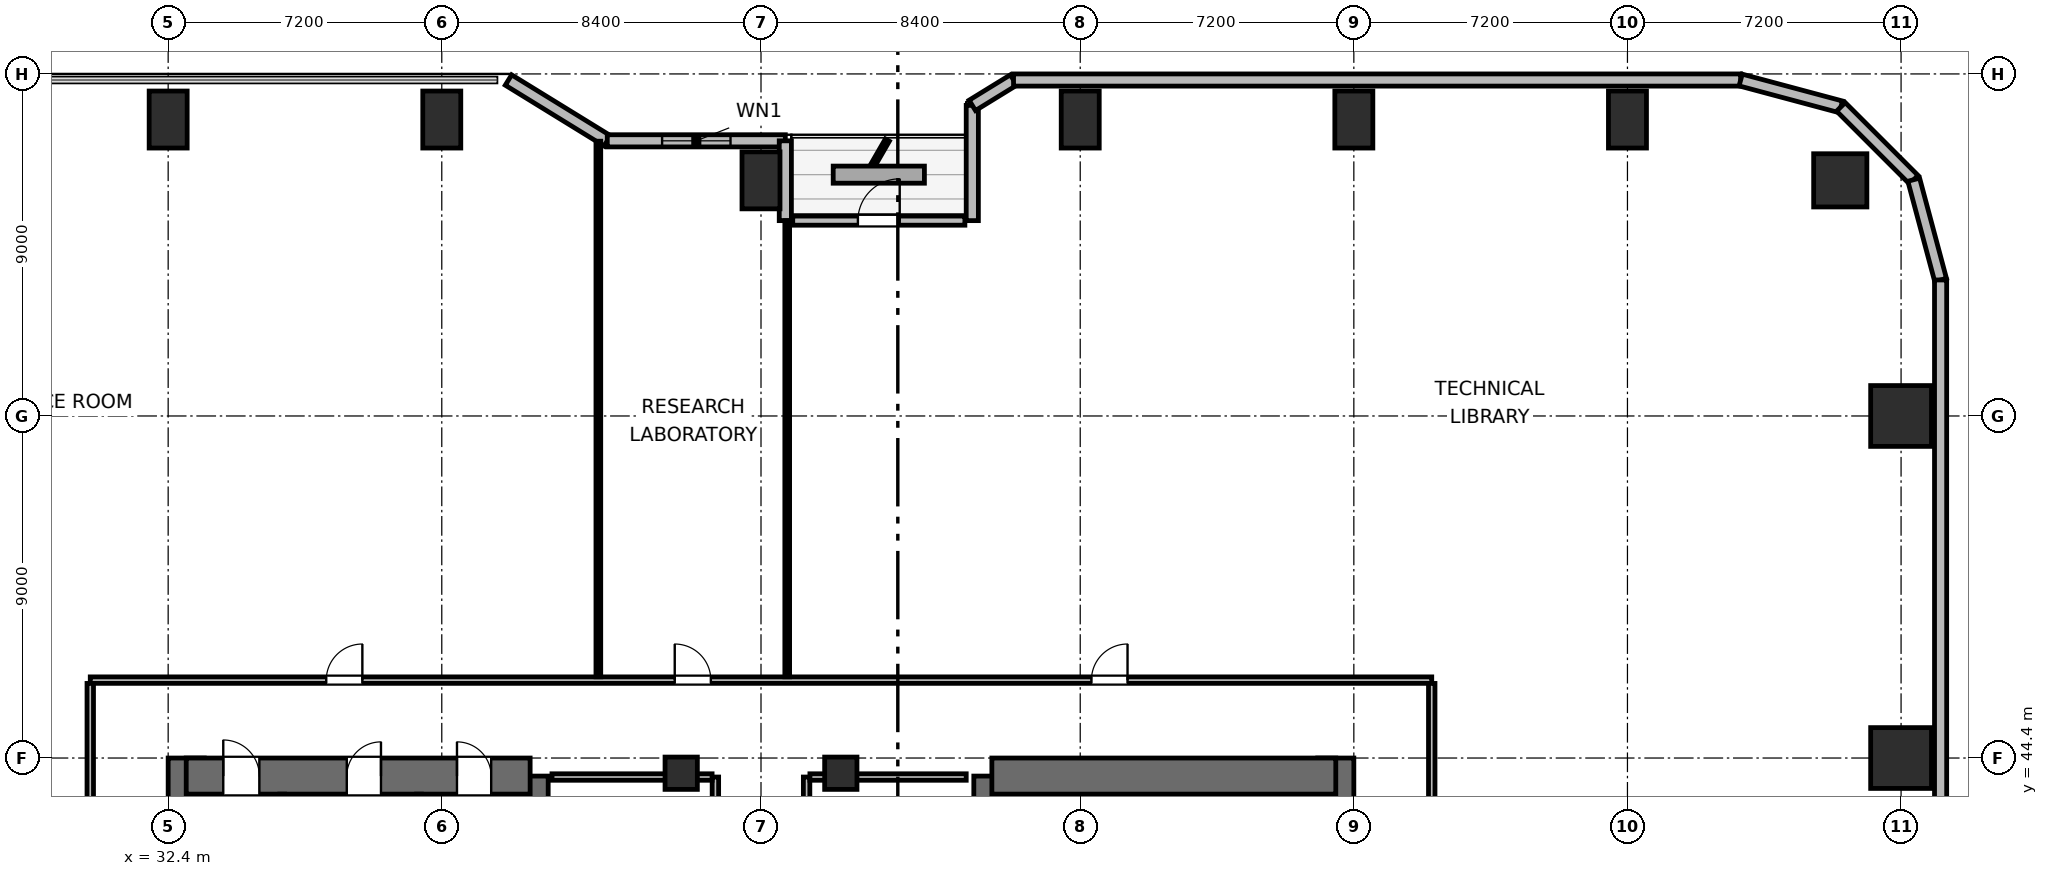
"""IFC4 building model, lengths in metres.
Left out: names, types, materials, properties, quantities, classifications, styles, units other than length and angle.
Written with IfcOpenShell. Run it as: python <this file> out.ifc"""

import sys

from ifc_helpers import new_model, si_unit, direction, frame, frame_2d, origin, origin_2d, place, context, subcontext, project, spatial, rectangle, circle, extrude, element, fill, save


model = new_model("IFC4")
c1 = context("Model", 3, precision=1e-05, world=origin(), true_north=direction((0.0, 1.0)))
c2 = subcontext(c1, "Body", "Model", "MODEL_VIEW")
j1 = project(units=[si_unit("LENGTHUNIT", "METRE"), si_unit("PLANEANGLEUNIT", "RADIAN")], contexts=[c1])
p1 = place(None, origin())
s1 = spatial("IfcSite", under=j1, at=p1, CompositionType="ELEMENT")
p2 = place(p1, origin())
s2 = spatial("IfcBuilding", under=s1, at=p2, CompositionType="ELEMENT")
p3 = place(p2, frame((0.0, 0.0, 21.6)))
s3 = spatial("IfcBuildingStorey", under=s2, at=p3, CompositionType="ELEMENT", Elevation=21.6)
p4 = place(p3, frame((32.875, 27.6, 0.0), z_axis=(0.0, 0.0, 1.0), x_axis=(0.0, 1.0, 0.0)))
e1 = element("IfcWall", 1, at=p4, inside=s3, PredefinedType="SHEAR", context=c2, shape_type="SweptSolid", body=[
    extrude(rectangle(XDim=16.8, YDim=0.95, at=frame_2d((8.4, 0.0))), origin(), (0.0, 0.0, 1.0), 3.9),
])
p5 = place(p3, frame((41.925, 37.8, 0.0), z_axis=(0.0, 0.0, 1.0), x_axis=(0.0, 1.0, 0.0)))
e2 = element("IfcWall", 2, at=p5, inside=s3, PredefinedType="SHEAR", context=c2, shape_type="SweptSolid", body=[
    extrude(rectangle(XDim=6.125, YDim=0.95, at=frame_2d((3.062, 0.0))), origin(), (0.0, 0.0, 1.0), 3.9),
])
p6 = place(p3, frame((32.875, 43.925, 0.0), z_axis=(0.0, 0.0, 1.0), x_axis=(1.0, 0.0, 0.0)))
e3 = element("IfcWall", 3, at=p6, inside=s3, PredefinedType="SHEAR", context=c2, shape_type="SweptSolid", body=[
    extrude(rectangle(XDim=9.05, YDim=0.95, at=frame_2d((4.525, 0.0))), origin(), (0.0, 0.0, 1.0), 3.9),
])
p7 = place(p6, frame((0.975, 0.0, 0.0)))
e4 = element("IfcOpeningElement", 4, at=p7, cuts=e3, PredefinedType="OPENING", context=c2, shape_type="SweptSolid", body=[
    extrude(rectangle(XDim=0.95, YDim=2.04, at=frame_2d((0.475, 1.02))), frame((0.0, 0.485, 0.0), z_axis=(0.0, -1.0, 0.0), x_axis=(1.0, 0.0, 0.0)), (0.0, 0.0, 1.0), 0.97),
])
p8 = place(p6, frame((4.225, 0.0, 0.0)))
e5 = element("IfcOpeningElement", 5, at=p8, cuts=e3, PredefinedType="OPENING", context=c2, shape_type="SweptSolid", body=[
    extrude(rectangle(XDim=0.9, YDim=2.02, at=frame_2d((0.45, 1.01))), frame((0.0, 0.485, 0.0), z_axis=(0.0, -1.0, 0.0), x_axis=(1.0, 0.0, 0.0)), (0.0, 0.0, 1.0), 0.97),
])
p9 = place(p6, frame((7.125, 0.0, 0.0)))
e6 = element("IfcOpeningElement", 6, at=p9, cuts=e3, PredefinedType="OPENING", context=c2, shape_type="SweptSolid", body=[
    extrude(rectangle(XDim=0.9, YDim=2.02, at=frame_2d((0.45, 1.01))), frame((0.0, 0.485, 0.0), z_axis=(0.0, -1.0, 0.0), x_axis=(1.0, 0.0, 0.0)), (0.0, 0.0, 1.0), 0.97),
])
p10 = place(p3, frame((54.075, 38.0, 0.0), z_axis=(0.0, 0.0, 1.0), x_axis=(0.0, 1.0, 0.0)))
e7 = element("IfcWall", 7, at=p10, inside=s3, PredefinedType="SHEAR", context=c2, shape_type="SweptSolid", body=[
    extrude(rectangle(XDim=5.925, YDim=0.95, at=frame_2d((2.962, 0.0))), origin(), (0.0, 0.0, 1.0), 3.9),
])
p11 = place(p3, frame((63.125, 27.6, 0.0), z_axis=(0.0, 0.0, 1.0), x_axis=(0.0, 1.0, 0.0)))
e8 = element("IfcWall", 8, at=p11, inside=s3, PredefinedType="SHEAR", context=c2, shape_type="SweptSolid", body=[
    extrude(rectangle(XDim=16.8, YDim=0.95, at=frame_2d((8.4, 0.0))), origin(), (0.0, 0.0, 1.0), 3.9),
])
p12 = place(p3, frame((54.075, 43.925, 0.0), z_axis=(0.0, 0.0, 1.0), x_axis=(1.0, 0.0, 0.0)))
e9 = element("IfcWall", 9, at=p12, inside=s3, PredefinedType="SHEAR", context=c2, shape_type="SweptSolid", body=[
    extrude(rectangle(XDim=9.05, YDim=0.95, at=frame_2d((4.525, 0.0))), origin(), (0.0, 0.0, 1.0), 3.9),
])
p13 = place(p3, frame((76.4, 59.6, 0.0), z_axis=(0.0, 0.0, 1.0), x_axis=(1.0, 0.0, 0.0)))
e10 = element("IfcColumn", 10, at=p13, inside=s3, PredefinedType="COLUMN", context=c2, shape_type="SweptSolid", body=[
    extrude(circle(Radius=0.7, at=origin_2d()), origin(), (0.0, 0.0, 1.0), 3.9),
])
for number, where, z_axis, x_axis in (
    (11, (32.4, 61.2, 0.0), (0.0, 0.0, 1.0), (1.0, 0.0, 0.0)),
    (12, (39.6, 61.2, 0.0), (0.0, 0.0, 1.0), (1.0, 0.0, 0.0)),
    (13, (48.0, 59.6, 0.0), (0.0, 0.0, 1.0), (1.0, 0.0, 0.0)),
    (14, (56.4, 61.2, 0.0), (0.0, 0.0, 1.0), (1.0, 0.0, 0.0)),
    (15, (63.6, 61.2, 0.0), (0.0, 0.0, 1.0), (1.0, 0.0, 0.0)),
    (16, (70.8, 61.2, 0.0), (0.0, 0.0, 1.0), (1.0, 0.0, 0.0)),
):
    element("IfcColumn", number, at=place(p3, frame(where, z_axis=z_axis, x_axis=x_axis)), inside=s3, PredefinedType="COLUMN", context=c2, shape_type="SweptSolid", body=[
        extrude(rectangle(XDim=1.0, YDim=1.5, at=origin_2d()), origin(), (0.0, 0.0, 1.0), 3.9),
    ])
for number, where, z_axis, x_axis in (
    (17, (78.0, 44.4, 0.0), (0.0, 0.0, 1.0), (1.0, 0.0, 0.0)),
    (18, (78.0, 53.4, 0.0), (0.0, 0.0, 1.0), (1.0, 0.0, 0.0)),
):
    element("IfcColumn", number, at=place(p3, frame(where, z_axis=z_axis, x_axis=x_axis)), inside=s3, PredefinedType="COLUMN", context=c2, shape_type="SweptSolid", body=[
        extrude(rectangle(XDim=1.6, YDim=1.6, at=origin_2d()), origin(), (0.0, 0.0, 1.0), 3.9),
    ])
for number, where, z_axis, x_axis in (
    (19, (45.9, 44.0, 0.0), (0.0, 0.0, 1.0), (1.0, 0.0, 0.0)),
    (20, (50.1, 44.0, 0.0), (0.0, 0.0, 1.0), (1.0, 0.0, 0.0)),
):
    element("IfcColumn", number, at=place(p3, frame(where, z_axis=z_axis, x_axis=x_axis)), inside=s3, PredefinedType="COLUMN", context=c2, shape_type="SweptSolid", body=[
        extrude(rectangle(XDim=0.85, YDim=0.85, at=origin_2d()), origin(), (0.0, 0.0, 1.0), 3.9),
    ])
p14 = place(p3, frame((41.355, 62.24, 0.0), z_axis=(0.0, 0.0, 1.0), x_axis=(0.851630857047, -0.524142044989, 0.0)))
e21 = element("IfcWall", 21, at=p14, inside=s3, PredefinedType="SOLIDWALL", context=c2, shape_type="SweptSolid", body=[
    extrude(rectangle(XDim=3.053, YDim=0.32, at=frame_2d((1.526, 0.0))), origin(), (0.0, 0.0, 1.0), 2.875),
])
p15 = place(p3, frame((43.955, 60.64, 0.0), z_axis=(0.0, 0.0, 1.0), x_axis=(1.0, 0.0, 0.0)))
e22 = element("IfcWall", 22, at=p15, inside=s3, PredefinedType="SOLIDWALL", context=c2, shape_type="SweptSolid", body=[
    extrude(rectangle(XDim=4.685, YDim=0.32, at=frame_2d((2.343, 0.0))), origin(), (0.0, 0.0, 1.0), 2.875),
])
p16 = place(p15, frame((1.443, 0.0, 0.85)))
e23 = element("IfcOpeningElement", 23, at=p16, cuts=e22, PredefinedType="OPENING", context=c2, shape_type="SweptSolid", body=[
    extrude(rectangle(XDim=1.8, YDim=1.1, at=frame_2d((0.9, 0.55))), frame((0.0, 0.17, 0.0), z_axis=(0.0, -1.0, 0.0), x_axis=(1.0, 0.0, 0.0)), (0.0, 0.0, 1.0), 0.34),
])
p17 = place(p3, frame((48.64, 60.64, 0.0), z_axis=(0.0, 0.0, 1.0), x_axis=(0.0, -1.0, 0.0)))
e24 = element("IfcWall", 24, at=p17, inside=s3, PredefinedType="SOLIDWALL", context=c2, shape_type="SweptSolid", body=[
    extrude(rectangle(XDim=2.1, YDim=0.32, at=frame_2d((1.05, 0.0))), origin(), (0.0, 0.0, 1.0), 2.875),
])
p18 = place(p3, frame((48.835, 58.54, 0.0), z_axis=(0.0, 0.0, 1.0), x_axis=(1.0, 0.0, 0.0)))
e25 = element("IfcWall", 25, at=p18, inside=s3, PredefinedType="SOLIDWALL", context=c2, shape_type="SweptSolid", body=[
    extrude(rectangle(XDim=4.53, YDim=0.24, at=frame_2d((2.265, 0.0))), origin(), (0.0, 0.0, 1.0), 3.64),
])
p19 = place(p18, frame((1.715, 0.0, 0.0)))
e26 = element("IfcOpeningElement", 26, at=p19, cuts=e25, PredefinedType="OPENING", context=c2, shape_type="SweptSolid", body=[
    extrude(rectangle(XDim=1.1, YDim=2.04, at=frame_2d((0.55, 1.02))), frame((0.0, 0.13, 0.0), z_axis=(0.0, -1.0, 0.0), x_axis=(1.0, 0.0, 0.0)), (0.0, 0.0, 1.0), 0.26),
])
p20 = place(p3, frame((53.56, 58.54, 0.0), z_axis=(0.0, 0.0, 1.0), x_axis=(0.0, 1.0, 0.0)))
e27 = element("IfcWall", 27, at=p20, inside=s3, PredefinedType="SOLIDWALL", context=c2, shape_type="SweptSolid", body=[
    extrude(rectangle(XDim=3.032, YDim=0.32, at=frame_2d((1.516, 0.0))), origin(), (0.0, 0.0, 1.0), 2.875),
])
p21 = place(p3, frame((53.56, 61.573, 0.0), z_axis=(0.0, 0.0, 1.0), x_axis=(0.851776724646, 0.523904964045, 0.0)))
e28 = element("IfcWall", 28, at=p21, inside=s3, PredefinedType="SOLIDWALL", context=c2, shape_type="SweptSolid", body=[
    extrude(rectangle(XDim=1.274, YDim=0.32, at=frame_2d((0.637, 0.0))), origin(), (0.0, 0.0, 1.0), 3.64),
])
p22 = place(p3, frame((54.645, 62.24, 0.0), z_axis=(0.0, 0.0, 1.0), x_axis=(1.0, 0.0, 0.0)))
e29 = element("IfcWall", 29, at=p22, inside=s3, PredefinedType="SOLIDWALL", context=c2, shape_type="SweptSolid", body=[
    extrude(rectangle(XDim=19.134, YDim=0.32, at=frame_2d((9.567, 0.0))), origin(), (0.0, 0.0, 1.0), 3.64),
])
p23 = place(p3, frame((73.779, 62.24, 0.0), z_axis=(0.0, 0.0, 1.0), x_axis=(0.965964405026, -0.25867502435, 0.0)))
e30 = element("IfcWall", 30, at=p23, inside=s3, PredefinedType="SOLIDWALL", context=c2, shape_type="SweptSolid", body=[
    extrude(rectangle(XDim=2.731, YDim=0.32, at=frame_2d((1.366, 0.0))), origin(), (0.0, 0.0, 1.0), 3.64),
])
p24 = place(p3, frame((76.417, 61.533, 0.0), z_axis=(0.0, 0.0, 1.0), x_axis=(0.707106781187, -0.707106781187, 0.0)))
e31 = element("IfcWall", 31, at=p24, inside=s3, PredefinedType="SOLIDWALL", context=c2, shape_type="SweptSolid", body=[
    extrude(rectangle(XDim=2.71, YDim=0.32, at=frame_2d((1.355, 0.0))), origin(), (0.0, 0.0, 1.0), 3.64),
])
p25 = place(p3, frame((78.333, 59.617, 0.0), z_axis=(0.0, 0.0, 1.0), x_axis=(0.25869736047, -0.965958423373, 0.0)))
e32 = element("IfcWall", 32, at=p25, inside=s3, PredefinedType="SOLIDWALL", context=c2, shape_type="SweptSolid", body=[
    extrude(rectangle(XDim=2.731, YDim=0.32, at=frame_2d((1.366, 0.0))), origin(), (0.0, 0.0, 1.0), 3.64),
])
p26 = place(p3, frame((79.04, 56.979, 0.0), z_axis=(0.0, 0.0, 1.0), x_axis=(0.0, -1.0, 0.0)))
e33 = element("IfcWall", 33, at=p26, inside=s3, PredefinedType="SOLIDWALL", context=c2, shape_type="SweptSolid", body=[
    extrude(rectangle(XDim=14.219, YDim=0.32, at=frame_2d((7.109, 0.0))), origin(), (0.0, 0.0, 1.0), 3.64),
])
for number, where, z_axis, x_axis in (
    (34, (35.4, 41.095, 0.0), (0.0, 0.0, 1.0), (0.0, 1.0, 0.0)),
    (35, (39.0, 41.095, 0.0), (0.0, 0.0, 1.0), (0.0, 1.0, 0.0)),
):
    element("IfcWall", number, at=place(p3, frame(where, z_axis=z_axis, x_axis=x_axis)), inside=s3, PredefinedType="PARTITIONING", context=c2, shape_type="SweptSolid", body=[
        extrude(rectangle(XDim=2.355, YDim=0.125, at=frame_2d((1.177, 0.0))), origin(), (0.0, 0.0, 1.0), 3.64),
    ])
p27 = place(p3, frame((46.8, 37.9, 0.0), z_axis=(0.0, 0.0, 1.0), x_axis=(0.0, 1.0, 0.0)))
e36 = element("IfcWall", 36, at=p27, inside=s3, PredefinedType="PARTITIONING", context=c2, shape_type="SweptSolid", body=[
    extrude(rectangle(XDim=6.0, YDim=0.17, at=frame_2d((3.0, 0.0))), origin(), (0.0, 0.0, 1.0), 3.64),
])
p28 = place(p27, frame((1.47, 0.0, 0.0)))
e37 = element("IfcOpeningElement", 37, at=p28, cuts=e36, PredefinedType="OPENING", context=c2, shape_type="SweptSolid", body=[
    extrude(rectangle(XDim=0.9, YDim=2.02, at=frame_2d((0.45, 1.01))), frame((0.0, 0.095, 0.0), z_axis=(0.0, -1.0, 0.0), x_axis=(1.0, 0.0, 0.0)), (0.0, 0.0, 1.0), 0.19),
])
p29 = place(p27, frame((4.47, 0.0, 0.0)))
e38 = element("IfcOpeningElement", 38, at=p29, cuts=e36, PredefinedType="OPENING", context=c2, shape_type="SweptSolid", body=[
    extrude(rectangle(XDim=0.9, YDim=2.02, at=frame_2d((0.45, 1.01))), frame((0.0, 0.095, 0.0), z_axis=(0.0, -1.0, 0.0), x_axis=(1.0, 0.0, 0.0)), (0.0, 0.0, 1.0), 0.19),
])
p30 = place(p3, frame((42.5, 43.9, 0.0), z_axis=(0.0, 0.0, 1.0), x_axis=(1.0, 0.0, 0.0)))
e39 = element("IfcWall", 39, at=p30, inside=s3, PredefinedType="PARTITIONING", context=c2, shape_type="SweptSolid", body=[
    extrude(rectangle(XDim=4.213, YDim=0.17, at=frame_2d((2.106, 0.0))), origin(), (0.0, 0.0, 1.0), 2.525),
])
p31 = place(p3, frame((49.2, 37.9, 0.0), z_axis=(0.0, 0.0, 1.0), x_axis=(0.0, 1.0, 0.0)))
e40 = element("IfcWall", 40, at=p31, inside=s3, PredefinedType="PARTITIONING", context=c2, shape_type="SweptSolid", body=[
    extrude(rectangle(XDim=6.0, YDim=0.17, at=frame_2d((3.0, 0.0))), origin(), (0.0, 0.0, 1.0), 3.64),
])
p32 = place(p31, frame((2.55, 0.0, 0.0)))
e41 = element("IfcOpeningElement", 41, at=p32, cuts=e40, PredefinedType="OPENING", context=c2, shape_type="SweptSolid", body=[
    extrude(rectangle(XDim=0.9, YDim=2.02, at=frame_2d((0.45, 1.01))), frame((0.0, 0.095, 0.0), z_axis=(0.0, -1.0, 0.0), x_axis=(1.0, 0.0, 0.0)), (0.0, 0.0, 1.0), 0.19),
])
p33 = place(p3, frame((49.287, 43.9, 0.0), z_axis=(0.0, 0.0, 1.0), x_axis=(1.0, 0.0, 0.0)))
e42 = element("IfcWall", 42, at=p33, inside=s3, PredefinedType="PARTITIONING", context=c2, shape_type="SweptSolid", body=[
    extrude(rectangle(XDim=4.113, YDim=0.17, at=frame_2d((2.056, 0.0))), origin(), (0.0, 0.0, 1.0), 2.525),
])
p34 = place(p3, frame((30.35, 46.45, 0.0), z_axis=(0.0, 0.0, 1.0), x_axis=(1.0, 0.0, 0.0)))
e43 = element("IfcWall", 43, at=p34, inside=s3, PredefinedType="PARTITIONING", context=c2, shape_type="SweptSolid", body=[
    extrude(rectangle(XDim=35.3, YDim=0.17, at=frame_2d((17.65, 0.0))), origin(), (0.0, 0.0, 1.0), 3.64),
])
p35 = place(p34, frame((6.21, 0.0, 0.0)))
e44 = element("IfcOpeningElement", 44, at=p35, cuts=e43, PredefinedType="OPENING", context=c2, shape_type="SweptSolid", body=[
    extrude(rectangle(XDim=0.95, YDim=2.04, at=frame_2d((0.475, 1.02))), frame((0.0, 0.095, 0.0), z_axis=(0.0, -1.0, 0.0), x_axis=(1.0, 0.0, 0.0)), (0.0, 0.0, 1.0), 0.19),
])
p36 = place(p34, frame((15.38, 0.0, 0.0)))
e45 = element("IfcOpeningElement", 45, at=p36, cuts=e43, PredefinedType="OPENING", context=c2, shape_type="SweptSolid", body=[
    extrude(rectangle(XDim=0.95, YDim=2.04, at=frame_2d((0.475, 1.02))), frame((0.0, 0.095, 0.0), z_axis=(0.0, -1.0, 0.0), x_axis=(1.0, 0.0, 0.0)), (0.0, 0.0, 1.0), 0.19),
])
p37 = place(p34, frame((26.345, 0.0, 0.0)))
e46 = element("IfcOpeningElement", 46, at=p37, cuts=e43, PredefinedType="OPENING", context=c2, shape_type="SweptSolid", body=[
    extrude(rectangle(XDim=0.95, YDim=2.04, at=frame_2d((0.475, 1.02))), frame((0.0, 0.095, 0.0), z_axis=(0.0, -1.0, 0.0), x_axis=(1.0, 0.0, 0.0)), (0.0, 0.0, 1.0), 0.19),
])
p38 = place(p3, frame((30.35, 25.637, 0.0), z_axis=(0.0, 0.0, 1.0), x_axis=(0.0, 1.0, 0.0)))
e47 = element("IfcWall", 47, at=p38, inside=s3, PredefinedType="PARTITIONING", context=c2, shape_type="SweptSolid", body=[
    extrude(rectangle(XDim=20.726, YDim=0.17, at=frame_2d((10.363, 0.0))), origin(), (0.0, 0.0, 1.0), 3.64),
])
p39 = place(p38, frame((4.263, 0.0, 0.0)))
e48 = element("IfcOpeningElement", 48, at=p39, cuts=e47, PredefinedType="OPENING", context=c2, shape_type="SweptSolid", body=[
    extrude(rectangle(XDim=0.95, YDim=2.04, at=frame_2d((0.475, 1.02))), frame((0.0, 0.095, 0.0), z_axis=(0.0, -1.0, 0.0), x_axis=(1.0, 0.0, 0.0)), (0.0, 0.0, 1.0), 0.19),
])
p40 = place(p38, frame((14.713, 0.0, 0.0)))
e49 = element("IfcOpeningElement", 49, at=p40, cuts=e47, PredefinedType="OPENING", context=c2, shape_type="SweptSolid", body=[
    extrude(rectangle(XDim=0.95, YDim=2.04, at=frame_2d((0.475, 1.02))), frame((0.0, 0.095, 0.0), z_axis=(0.0, -1.0, 0.0), x_axis=(1.0, 0.0, 0.0)), (0.0, 0.0, 1.0), 0.19),
])
p41 = place(p3, frame((65.65, 25.637, 0.0), z_axis=(0.0, 0.0, 1.0), x_axis=(0.0, 1.0, 0.0)))
e50 = element("IfcWall", 50, at=p41, inside=s3, PredefinedType="PARTITIONING", context=c2, shape_type="SweptSolid", body=[
    extrude(rectangle(XDim=20.726, YDim=0.17, at=frame_2d((10.363, 0.0))), origin(), (0.0, 0.0, 1.0), 3.64),
])
p42 = place(p41, frame((4.163, 0.0, 0.0)))
e51 = element("IfcOpeningElement", 51, at=p42, cuts=e50, PredefinedType="OPENING", context=c2, shape_type="SweptSolid", body=[
    extrude(rectangle(XDim=0.95, YDim=2.04, at=frame_2d((0.475, 1.02))), frame((0.0, 0.095, 0.0), z_axis=(0.0, -1.0, 0.0), x_axis=(1.0, 0.0, 0.0)), (0.0, 0.0, 1.0), 0.19),
])
p43 = place(p41, frame((14.613, 0.0, 0.0)))
e52 = element("IfcOpeningElement", 52, at=p43, cuts=e50, PredefinedType="OPENING", context=c2, shape_type="SweptSolid", body=[
    extrude(rectangle(XDim=0.95, YDim=2.04, at=frame_2d((0.475, 1.02))), frame((0.0, 0.095, 0.0), z_axis=(0.0, -1.0, 0.0), x_axis=(1.0, 0.0, 0.0)), (0.0, 0.0, 1.0), 0.19),
])
p44 = place(p3, frame((43.72, 46.537, 0.0), z_axis=(0.0, 0.0, 1.0), x_axis=(0.0, 1.0, 0.0)))
e53 = element("IfcWall", 53, at=p44, inside=s3, PredefinedType="PARTITIONING", context=c2, shape_type="SweptSolid", body=[
    extrude(rectangle(XDim=14.093, YDim=0.125, at=frame_2d((7.046, 0.0))), origin(), (0.0, 0.0, 1.0), 3.003),
])
p45 = place(p3, frame((48.69, 46.537, 0.0), z_axis=(0.0, 0.0, 1.0), x_axis=(0.0, 1.0, 0.0)))
e54 = element("IfcWall", 54, at=p45, inside=s3, PredefinedType="PARTITIONING", context=c2, shape_type="SweptSolid", body=[
    extrude(rectangle(XDim=12.003, YDim=0.125, at=frame_2d((6.001, 0.0))), origin(), (0.0, 0.0, 1.0), 3.64),
])
p46 = place(p16, origin())
e55 = element("IfcWindow", 55, at=p46, inside=s3, PartitioningType="SINGLE_PANEL", PredefinedType="WINDOW", context=c2, shape_type="SweptSolid", body=[
    extrude(rectangle(XDim=1.8, YDim=1.1, at=frame_2d((0.9, 0.55))), frame((0.0, 0.03, 0.0), z_axis=(0.0, -1.0, 0.0), x_axis=(1.0, 0.0, 0.0)), (0.0, 0.0, 1.0), 0.06),
])
fill(e23, e55)
p47 = place(p19, origin())
e56 = element("IfcDoor", 56, at=p47, inside=s3, OperationType="SINGLE_SWING_RIGHT", PredefinedType="DOOR", context=c2, shape_type="SweptSolid", body=[
    extrude(rectangle(XDim=1.1, YDim=2.04, at=frame_2d((0.55, 1.02))), frame((0.0, 0.025, 0.0), z_axis=(0.0, -1.0, 0.0), x_axis=(1.0, 0.0, 0.0)), (0.0, 0.0, 1.0), 0.05),
])
fill(e26, e56)
p48 = place(p7, origin())
e57 = element("IfcDoor", 57, at=p48, inside=s3, OperationType="SINGLE_SWING_LEFT", PredefinedType="DOOR", context=c2, shape_type="SweptSolid", body=[
    extrude(rectangle(XDim=0.95, YDim=2.04, at=frame_2d((0.475, 1.02))), frame((0.0, 0.025, 0.0), z_axis=(0.0, -1.0, 0.0), x_axis=(1.0, 0.0, 0.0)), (0.0, 0.0, 1.0), 0.05),
])
fill(e4, e57)
p49 = place(p8, origin())
e58 = element("IfcDoor", 58, at=p49, inside=s3, OperationType="SINGLE_SWING_RIGHT", PredefinedType="DOOR", context=c2, shape_type="SweptSolid", body=[
    extrude(rectangle(XDim=0.9, YDim=2.02, at=frame_2d((0.45, 1.01))), frame((0.0, 0.025, 0.0), z_axis=(0.0, -1.0, 0.0), x_axis=(1.0, 0.0, 0.0)), (0.0, 0.0, 1.0), 0.05),
])
fill(e5, e58)
p50 = place(p9, origin())
e59 = element("IfcDoor", 59, at=p50, inside=s3, OperationType="SINGLE_SWING_LEFT", PredefinedType="DOOR", context=c2, shape_type="SweptSolid", body=[
    extrude(rectangle(XDim=0.9, YDim=2.02, at=frame_2d((0.45, 1.01))), frame((0.0, 0.025, 0.0), z_axis=(0.0, -1.0, 0.0), x_axis=(1.0, 0.0, 0.0)), (0.0, 0.0, 1.0), 0.05),
])
fill(e6, e59)
p51 = place(p35, origin())
e60 = element("IfcDoor", 60, at=p51, inside=s3, OperationType="SINGLE_SWING_RIGHT", PredefinedType="DOOR", context=c2, shape_type="SweptSolid", body=[
    extrude(rectangle(XDim=0.95, YDim=2.04, at=frame_2d((0.475, 1.02))), frame((0.0, 0.025, 0.0), z_axis=(0.0, -1.0, 0.0), x_axis=(1.0, 0.0, 0.0)), (0.0, 0.0, 1.0), 0.05),
])
fill(e44, e60)
p52 = place(p36, origin())
e61 = element("IfcDoor", 61, at=p52, inside=s3, OperationType="SINGLE_SWING_LEFT", PredefinedType="DOOR", context=c2, shape_type="SweptSolid", body=[
    extrude(rectangle(XDim=0.95, YDim=2.04, at=frame_2d((0.475, 1.02))), frame((0.0, 0.025, 0.0), z_axis=(0.0, -1.0, 0.0), x_axis=(1.0, 0.0, 0.0)), (0.0, 0.0, 1.0), 0.05),
])
fill(e45, e61)
p53 = place(p37, origin())
e62 = element("IfcDoor", 62, at=p53, inside=s3, OperationType="SINGLE_SWING_RIGHT", PredefinedType="DOOR", context=c2, shape_type="SweptSolid", body=[
    extrude(rectangle(XDim=0.95, YDim=2.04, at=frame_2d((0.475, 1.02))), frame((0.0, 0.025, 0.0), z_axis=(0.0, -1.0, 0.0), x_axis=(1.0, 0.0, 0.0)), (0.0, 0.0, 1.0), 0.05),
])
fill(e46, e62)
save(model, sys.argv[1])
